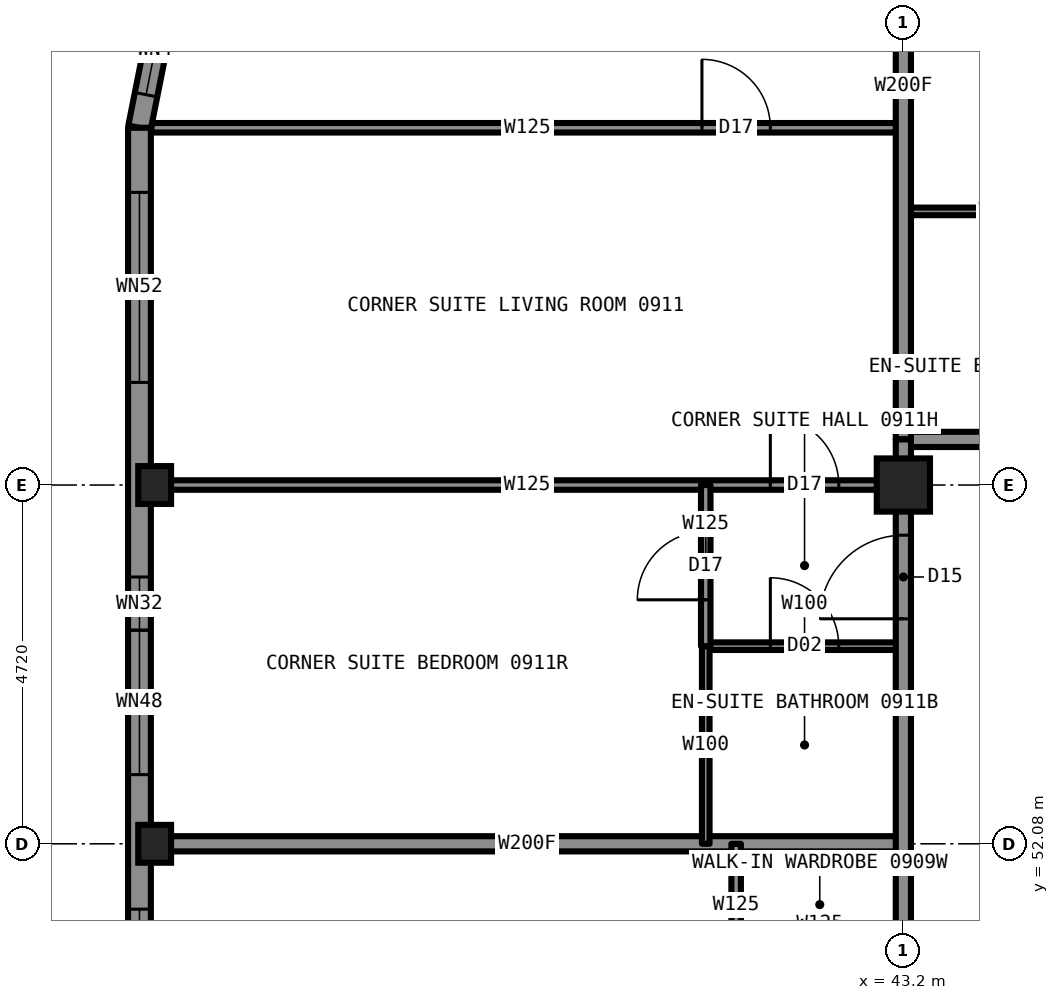
"""IFC4 building model, lengths in metres.
Left out: names, types, materials, properties, quantities, classifications, styles, units other than length and angle.
Written with IfcOpenShell. Run it as: python <this file> out.ifc"""

import sys

from ifc_helpers import new_model, si_unit, direction, frame, frame_2d, origin, origin_2d, place, context, subcontext, project, spatial, rectangle, hollow_rectangle, i_section, extrude, element, fill, save


model = new_model("IFC4")
c1 = context("Model", 3, precision=1e-05, world=origin(), true_north=direction((0.0, 1.0)))
c2 = subcontext(c1, "Body", "Model", "MODEL_VIEW")
j1 = project(units=[si_unit("LENGTHUNIT", "METRE"), si_unit("PLANEANGLEUNIT", "RADIAN")], contexts=[c1])
p1 = place(None, origin())
s1 = spatial("IfcSite", under=j1, at=p1, CompositionType="ELEMENT")
p2 = place(p1, origin())
s2 = spatial("IfcBuilding", under=s1, at=p2, CompositionType="ELEMENT")
p3 = place(p2, frame((0.0, 0.0, 39.0)))
s3 = spatial("IfcBuildingStorey", under=s2, at=p3, CompositionType="ELEMENT", Elevation=39.0)
for number, where, z_axis, x_axis in (
    (1, (33.35, 52.08, 0.0), (0.0, 0.0, 1.0), (1.0, 0.0, 0.0)),
    (2, (33.35, 56.8, 0.0), (0.0, 0.0, 1.0), (1.0, 0.0, 0.0)),
):
    element("IfcColumn", number, at=place(p3, frame(where, z_axis=z_axis, x_axis=x_axis)), inside=s3, PredefinedType="COLUMN", context=c2, shape_type="SweptSolid", body=[
        extrude(i_section(OverallWidth=0.432, OverallDepth=0.498, WebThickness=0.056, FlangeThickness=0.089, at=origin_2d()), origin(), (0.0, 0.0, 1.0), 3.5),
    ])
p4 = place(p3, frame((43.2, 56.8, 0.0), z_axis=(0.0, 0.0, 1.0), x_axis=(1.0, 0.0, 0.0)))
e3 = element("IfcColumn", 3, at=p4, inside=s3, PredefinedType="COLUMN", context=c2, shape_type="SweptSolid", body=[
    extrude(hollow_rectangle(XDim=0.7, YDim=0.7, WallThickness=0.06, at=origin_2d()), origin(), (0.0, 0.0, 1.0), 3.5),
])
p5 = place(p3, frame((33.3, 56.8, 0.0), z_axis=(0.0, 0.0, 1.0), x_axis=(1.0, 0.0, 0.0)))
e4 = element("IfcWall", 4, at=p5, inside=s3, PredefinedType="PARTITIONING", context=c2, shape_type="SweptSolid", body=[
    extrude(rectangle(XDim=9.9, YDim=0.125, at=frame_2d((4.95, 0.0))), origin(), (0.0, 0.0, 1.0), 2.573),
])
p6 = place(p5, frame((8.15, 0.0, 0.0)))
e5 = element("IfcOpeningElement", 5, at=p6, cuts=e4, PredefinedType="OPENING", context=c2, shape_type="SweptSolid", body=[
    extrude(rectangle(XDim=0.9, YDim=2.2, at=frame_2d((0.45, 1.1))), frame((0.0, 0.073, 0.0), z_axis=(0.0, -1.0, 0.0), x_axis=(1.0, 0.0, 0.0)), (0.0, 0.0, 1.0), 0.145),
])
p7 = place(p3, frame((43.2, 57.4, 0.0), z_axis=(0.0, 0.0, 1.0), x_axis=(1.0, 0.0, 0.0)))
e6 = element("IfcWall", 6, at=p7, inside=s3, PredefinedType="PARTITIONING", context=c2, shape_type="SweptSolid", body=[
    extrude(rectangle(XDim=23.6, YDim=0.2, at=frame_2d((11.8, 0.0))), origin(), (0.0, 0.0, 1.0), 3.33),
])
p8 = place(p7, frame((3.0, 0.0, 0.0)))
e7 = element("IfcOpeningElement", 7, at=p8, cuts=e6, PredefinedType="OPENING", context=c2, shape_type="SweptSolid", body=[
    extrude(rectangle(XDim=1.0, YDim=2.2, at=frame_2d((0.5, 1.1))), frame((0.0, 0.11, 0.0), z_axis=(0.0, -1.0, 0.0), x_axis=(1.0, 0.0, 0.0)), (0.0, 0.0, 1.0), 0.22),
])
p9 = place(p7, frame((11.29, 0.0, 0.0)))
e8 = element("IfcOpeningElement", 8, at=p9, cuts=e6, PredefinedType="OPENING", context=c2, shape_type="SweptSolid", body=[
    extrude(rectangle(XDim=1.1, YDim=2.2, at=frame_2d((0.55, 1.1))), frame((0.0, 0.11, 0.0), z_axis=(0.0, -1.0, 0.0), x_axis=(1.0, 0.0, 0.0)), (0.0, 0.0, 1.0), 0.22),
])
p10 = place(p3, frame((43.2, 60.4, 0.0), z_axis=(0.0, 0.0, 1.0), x_axis=(1.0, 0.0, 0.0)))
e9 = element("IfcWall", 9, at=p10, inside=s3, PredefinedType="PARTITIONING", context=c2, shape_type="SweptSolid", body=[
    extrude(rectangle(XDim=2.6, YDim=0.1, at=frame_2d((1.3, 0.0))), origin(), (0.0, 0.0, 1.0), 3.33),
])
p11 = place(p3, frame((33.306, 61.5, 0.0), z_axis=(0.0, 0.0, 1.0), x_axis=(1.0, 0.0, 0.0)))
e10 = element("IfcWall", 10, at=p11, inside=s3, PredefinedType="PARTITIONING", context=c2, shape_type="SweptSolid", body=[
    extrude(rectangle(XDim=9.894, YDim=0.125, at=frame_2d((4.947, 0.0))), origin(), (0.0, 0.0, 1.0), 3.33),
])
p12 = place(p11, frame((7.244, 0.0, 0.0)))
e11 = element("IfcOpeningElement", 11, at=p12, cuts=e10, PredefinedType="OPENING", context=c2, shape_type="SweptSolid", body=[
    extrude(rectangle(XDim=0.9, YDim=2.2, at=frame_2d((0.45, 1.1))), frame((0.0, 0.073, 0.0), z_axis=(0.0, -1.0, 0.0), x_axis=(1.0, 0.0, 0.0)), (0.0, 0.0, 1.0), 0.145),
])
p13 = place(p3, frame((33.3, 52.08, 0.0), z_axis=(0.0, 0.0, 1.0), x_axis=(1.0, 0.0, 0.0)))
e12 = element("IfcWall", 12, at=p13, inside=s3, PredefinedType="PARTITIONING", context=c2, shape_type="SweptSolid", body=[
    extrude(rectangle(XDim=9.9, YDim=0.2, at=frame_2d((4.95, 0.0))), origin(), (0.0, 0.0, 1.0), 2.573),
])
p14 = place(p3, frame((40.6, 54.68, 0.0), z_axis=(0.0, 0.0, 1.0), x_axis=(1.0, 0.0, 0.0)))
e13 = element("IfcWall", 13, at=p14, inside=s3, PredefinedType="PARTITIONING", context=c2, shape_type="SweptSolid", body=[
    extrude(rectangle(XDim=2.6, YDim=0.1, at=frame_2d((1.3, 0.0))), origin(), (0.0, 0.0, 1.0), 3.33),
])
p15 = place(p14, frame((0.85, 0.0, 0.0)))
e14 = element("IfcOpeningElement", 14, at=p15, cuts=e13, PredefinedType="OPENING", context=c2, shape_type="SweptSolid", body=[
    extrude(rectangle(XDim=0.9, YDim=2.1, at=frame_2d((0.45, 1.05))), frame((0.0, 0.06, 0.0), z_axis=(0.0, -1.0, 0.0), x_axis=(1.0, 0.0, 0.0)), (0.0, 0.0, 1.0), 0.12),
])
p16 = place(p3, frame((43.2, 33.2, 0.0), z_axis=(0.0, 0.0, 1.0), x_axis=(0.0, 1.0, 0.0)))
e15 = element("IfcWall", 15, at=p16, inside=s3, PredefinedType="PARTITIONING", context=c2, shape_type="SweptSolid", body=[
    extrude(rectangle(XDim=23.58, YDim=0.2, at=frame_2d((11.79, 0.0))), origin(), (0.0, 0.0, 1.0), 3.33),
])
p17 = place(p16, frame((7.27, 0.0, 0.0)))
e16 = element("IfcOpeningElement", 16, at=p17, cuts=e15, PredefinedType="OPENING", context=c2, shape_type="SweptSolid", body=[
    extrude(rectangle(XDim=1.0, YDim=2.2, at=frame_2d((0.5, 1.1))), frame((0.0, 0.11, 0.0), z_axis=(0.0, -1.0, 0.0), x_axis=(1.0, 0.0, 0.0)), (0.0, 0.0, 1.0), 0.22),
])
p18 = place(p16, frame((12.44, 0.0, 0.0)))
e17 = element("IfcOpeningElement", 17, at=p18, cuts=e15, PredefinedType="OPENING", context=c2, shape_type="SweptSolid", body=[
    extrude(rectangle(XDim=1.0, YDim=2.2, at=frame_2d((0.5, 1.1))), frame((0.0, 0.11, 0.0), z_axis=(0.0, -1.0, 0.0), x_axis=(1.0, 0.0, 0.0)), (0.0, 0.0, 1.0), 0.22),
])
p19 = place(p16, frame((21.84, 0.0, 0.0)))
e18 = element("IfcOpeningElement", 18, at=p19, cuts=e15, PredefinedType="OPENING", context=c2, shape_type="SweptSolid", body=[
    extrude(rectangle(XDim=1.1, YDim=2.2, at=frame_2d((0.55, 1.1))), frame((0.0, 0.11, 0.0), z_axis=(0.0, -1.0, 0.0), x_axis=(1.0, 0.0, 0.0)), (0.0, 0.0, 1.0), 0.22),
])
p20 = place(p16, frame((0.66, 0.0, 0.0)))
e19 = element("IfcOpeningElement", 19, at=p20, cuts=e15, PredefinedType="OPENING", context=c2, shape_type="SweptSolid", body=[
    extrude(rectangle(XDim=1.1, YDim=2.2, at=frame_2d((0.55, 1.1))), frame((0.0, 0.11, 0.0), z_axis=(0.0, -1.0, 0.0), x_axis=(1.0, 0.0, 0.0)), (0.0, 0.0, 1.0), 0.22),
])
p21 = place(p3, frame((43.2, 57.4, 0.0), z_axis=(0.0, 0.0, 1.0), x_axis=(0.0, 1.0, 0.0)))
e20 = element("IfcWall", 20, at=p21, inside=s3, PredefinedType="PARTITIONING", context=c2, shape_type="SweptSolid", body=[
    extrude(rectangle(XDim=9.3, YDim=0.2, at=frame_2d((4.65, 0.0))), origin(), (0.0, 0.0, 1.0), 2.573),
])
p22 = place(p3, frame((41.0, 50.48, 0.0), z_axis=(0.0, 0.0, 1.0), x_axis=(0.0, 1.0, 0.0)))
e21 = element("IfcWall", 21, at=p22, inside=s3, PredefinedType="PARTITIONING", context=c2, shape_type="SweptSolid", body=[
    extrude(rectangle(XDim=1.6, YDim=0.125, at=frame_2d((0.8, 0.0))), origin(), (0.0, 0.0, 1.0), 3.33),
])
p23 = place(p3, frame((40.6, 52.08, 0.0), z_axis=(0.0, 0.0, 1.0), x_axis=(0.0, 1.0, 0.0)))
e22 = element("IfcWall", 22, at=p23, inside=s3, PredefinedType="PARTITIONING", context=c2, shape_type="SweptSolid", body=[
    extrude(rectangle(XDim=2.6, YDim=0.1, at=frame_2d((1.3, 0.0))), origin(), (0.0, 0.0, 1.0), 3.33),
])
p24 = place(p3, frame((40.6, 54.68, 0.0), z_axis=(0.0, 0.0, 1.0), x_axis=(0.0, 1.0, 0.0)))
e23 = element("IfcWall", 23, at=p24, inside=s3, PredefinedType="PARTITIONING", context=c2, shape_type="SweptSolid", body=[
    extrude(rectangle(XDim=2.12, YDim=0.125, at=frame_2d((1.06, 0.0))), origin(), (0.0, 0.0, 1.0), 3.33),
])
p25 = place(p24, frame((0.61, 0.0, 0.0)))
e24 = element("IfcOpeningElement", 24, at=p25, cuts=e23, PredefinedType="OPENING", context=c2, shape_type="SweptSolid", body=[
    extrude(rectangle(XDim=0.9, YDim=2.2, at=frame_2d((0.45, 1.1))), frame((0.0, 0.073, 0.0), z_axis=(0.0, -1.0, 0.0), x_axis=(1.0, 0.0, 0.0)), (0.0, 0.0, 1.0), 0.145),
])
p26 = place(p3, frame((33.557, 63.547, 0.0), z_axis=(0.0, 0.0, 1.0), x_axis=(-0.195081421501, -0.980787050784, 0.0)))
e25 = element("IfcWall", 25, at=p26, inside=s3, PredefinedType="SOLIDWALL", context=c2, shape_type="SweptSolid", body=[
    extrude(rectangle(XDim=2.087, YDim=0.3, at=frame_2d((1.044, 0.0))), origin(), (0.0, 0.0, 1.0), 3.33),
])
p27 = place(p26, frame((0.444, 0.0, 0.5)))
e26 = element("IfcOpeningElement", 26, at=p27, cuts=e25, PredefinedType="OPENING", context=c2, shape_type="SweptSolid", body=[
    extrude(rectangle(XDim=1.2, YDim=2.0, at=frame_2d((0.6, 1.0))), frame((0.0, 0.16, 0.0), z_axis=(0.0, -1.0, 0.0), x_axis=(1.0, 0.0, 0.0)), (0.0, 0.0, 1.0), 0.32),
])
p28 = place(p3, frame((33.15, 61.5, 0.0), z_axis=(0.0, 0.0, 1.0), x_axis=(0.0, -1.0, 0.0)))
e27 = element("IfcWall", 27, at=p28, inside=s3, PredefinedType="SOLIDWALL", context=c2, shape_type="SweptSolid", body=[
    extrude(rectangle(XDim=33.0, YDim=0.3, at=frame_2d((16.5, 0.0))), origin(), (0.0, 0.0, 1.0), 2.83),
])
p29 = place(p28, frame((0.85, 0.0, 0.5)))
e28 = element("IfcOpeningElement", 28, at=p29, cuts=e27, PredefinedType="OPENING", context=c2, shape_type="SweptSolid", body=[
    extrude(rectangle(XDim=2.5, YDim=2.0, at=frame_2d((1.25, 1.0))), frame((0.0, 0.16, 0.0), z_axis=(0.0, -1.0, 0.0), x_axis=(1.0, 0.0, 0.0)), (0.0, 0.0, 1.0), 0.32),
])
p30 = place(p28, frame((6.61, 0.0, 0.5)))
e29 = element("IfcOpeningElement", 29, at=p30, cuts=e27, PredefinedType="OPENING", context=c2, shape_type="SweptSolid", body=[
    extrude(rectangle(XDim=1.9, YDim=1.9, at=frame_2d((0.95, 0.95))), frame((0.0, 0.16, 0.0), z_axis=(0.0, -1.0, 0.0), x_axis=(1.0, 0.0, 0.0)), (0.0, 0.0, 1.0), 0.32),
])
p31 = place(p28, frame((10.28, 0.0, 0.5)))
e30 = element("IfcOpeningElement", 30, at=p31, cuts=e27, PredefinedType="OPENING", context=c2, shape_type="SweptSolid", body=[
    extrude(rectangle(XDim=3.0, YDim=2.0, at=frame_2d((1.5, 1.0))), frame((0.0, 0.16, 0.0), z_axis=(0.0, -1.0, 0.0), x_axis=(1.0, 0.0, 0.0)), (0.0, 0.0, 1.0), 0.32),
])
p32 = place(p28, frame((15.0, 0.0, 0.5)))
e31 = element("IfcOpeningElement", 31, at=p32, cuts=e27, PredefinedType="OPENING", context=c2, shape_type="SweptSolid", body=[
    extrude(rectangle(XDim=3.0, YDim=2.0, at=frame_2d((1.5, 1.0))), frame((0.0, 0.16, 0.0), z_axis=(0.0, -1.0, 0.0), x_axis=(1.0, 0.0, 0.0)), (0.0, 0.0, 1.0), 0.32),
])
p33 = place(p28, frame((19.72, 0.0, 0.5)))
e32 = element("IfcOpeningElement", 32, at=p33, cuts=e27, PredefinedType="OPENING", context=c2, shape_type="SweptSolid", body=[
    extrude(rectangle(XDim=3.0, YDim=2.0, at=frame_2d((1.5, 1.0))), frame((0.0, 0.16, 0.0), z_axis=(0.0, -1.0, 0.0), x_axis=(1.0, 0.0, 0.0)), (0.0, 0.0, 1.0), 0.32),
])
p34 = place(p28, frame((24.44, 0.0, 0.5)))
e33 = element("IfcOpeningElement", 33, at=p34, cuts=e27, PredefinedType="OPENING", context=c2, shape_type="SweptSolid", body=[
    extrude(rectangle(XDim=1.9, YDim=1.9, at=frame_2d((0.95, 0.95))), frame((0.0, 0.16, 0.0), z_axis=(0.0, -1.0, 0.0), x_axis=(1.0, 0.0, 0.0)), (0.0, 0.0, 1.0), 0.32),
])
p35 = place(p28, frame((29.6, 0.0, 0.5)))
e34 = element("IfcOpeningElement", 34, at=p35, cuts=e27, PredefinedType="OPENING", context=c2, shape_type="SweptSolid", body=[
    extrude(rectangle(XDim=2.5, YDim=2.0, at=frame_2d((1.25, 1.0))), frame((0.0, 0.16, 0.0), z_axis=(0.0, -1.0, 0.0), x_axis=(1.0, 0.0, 0.0)), (0.0, 0.0, 1.0), 0.32),
])
p36 = place(p28, frame((5.91, 0.0, 0.5)))
e35 = element("IfcOpeningElement", 35, at=p36, cuts=e27, PredefinedType="OPENING", context=c2, shape_type="SweptSolid", body=[
    extrude(rectangle(XDim=0.7, YDim=1.0, at=frame_2d((0.35, 0.5))), frame((0.0, 0.16, 0.0), z_axis=(0.0, -1.0, 0.0), x_axis=(1.0, 0.0, 0.0)), (0.0, 0.0, 1.0), 0.32),
])
p37 = place(p28, frame((26.39, 0.0, 0.5)))
e36 = element("IfcOpeningElement", 36, at=p37, cuts=e27, PredefinedType="OPENING", context=c2, shape_type="SweptSolid", body=[
    extrude(rectangle(XDim=0.7, YDim=1.0, at=frame_2d((0.35, 0.5))), frame((0.0, 0.16, 0.0), z_axis=(0.0, -1.0, 0.0), x_axis=(1.0, 0.0, 0.0)), (0.0, 0.0, 1.0), 0.32),
])
p38 = place(p3, frame((43.2, 56.78, 0.0), z_axis=(0.0, 0.0, 1.0), x_axis=(0.0, 1.0, 0.0)))
e37 = element("IfcWall", 37, at=p38, inside=s3, PredefinedType="PARTITIONING", context=c2, shape_type="SweptSolid", body=[
    extrude(rectangle(XDim=0.62, YDim=0.2, at=frame_2d((0.31, 0.0))), origin(), (0.0, 0.0, 1.0), 2.573),
])
p39 = place(p6, origin())
e38 = element("IfcDoor", 38, at=p39, inside=s3, OperationType="SINGLE_SWING_LEFT", PredefinedType="DOOR", context=c2, shape_type="SweptSolid", body=[
    extrude(rectangle(XDim=0.9, YDim=2.2, at=frame_2d((0.45, 1.1))), frame((0.0, 0.025, 0.0), z_axis=(0.0, -1.0, 0.0), x_axis=(1.0, 0.0, 0.0)), (0.0, 0.0, 1.0), 0.05),
])
fill(e5, e38)
p40 = place(p15, origin())
e39 = element("IfcDoor", 39, at=p40, inside=s3, OperationType="SINGLE_SWING_RIGHT", PredefinedType="DOOR", context=c2, shape_type="SweptSolid", body=[
    extrude(rectangle(XDim=0.9, YDim=2.1, at=frame_2d((0.45, 1.05))), frame((0.0, 0.025, 0.0), z_axis=(0.0, -1.0, 0.0), x_axis=(1.0, 0.0, 0.0)), (0.0, 0.0, 1.0), 0.05),
])
fill(e14, e39)
p41 = place(p19, origin())
e40 = element("IfcDoor", 40, at=p41, inside=s3, OperationType="SINGLE_SWING_LEFT", PredefinedType="DOOR", context=c2, shape_type="SweptSolid", body=[
    extrude(rectangle(XDim=1.1, YDim=2.2, at=frame_2d((0.55, 1.1))), frame((0.0, 0.025, 0.0), z_axis=(0.0, -1.0, 0.0), x_axis=(1.0, 0.0, 0.0)), (0.0, 0.0, 1.0), 0.05),
])
fill(e18, e40)
p42 = place(p12, origin())
e41 = element("IfcDoor", 41, at=p42, inside=s3, OperationType="SINGLE_SWING_LEFT", PredefinedType="DOOR", context=c2, shape_type="SweptSolid", body=[
    extrude(rectangle(XDim=0.9, YDim=2.2, at=frame_2d((0.45, 1.1))), frame((0.0, 0.025, 0.0), z_axis=(0.0, -1.0, 0.0), x_axis=(1.0, 0.0, 0.0)), (0.0, 0.0, 1.0), 0.05),
])
fill(e11, e41)
p43 = place(p25, origin())
e42 = element("IfcDoor", 42, at=p43, inside=s3, OperationType="SINGLE_SWING_LEFT", PredefinedType="DOOR", context=c2, shape_type="SweptSolid", body=[
    extrude(rectangle(XDim=0.9, YDim=2.2, at=frame_2d((0.45, 1.1))), frame((0.0, 0.025, 0.0), z_axis=(0.0, -1.0, 0.0), x_axis=(1.0, 0.0, 0.0)), (0.0, 0.0, 1.0), 0.05),
])
fill(e24, e42)
p44 = place(p27, origin())
e43 = element("IfcWindow", 43, at=p44, inside=s3, PartitioningType="SINGLE_PANEL", PredefinedType="WINDOW", context=c2, shape_type="SweptSolid", body=[
    extrude(rectangle(XDim=1.2, YDim=2.0, at=frame_2d((0.6, 1.0))), frame((0.0, 0.03, 0.0), z_axis=(0.0, -1.0, 0.0), x_axis=(1.0, 0.0, 0.0)), (0.0, 0.0, 1.0), 0.06),
])
fill(e26, e43)
p45 = place(p29, origin())
e44 = element("IfcWindow", 44, at=p45, inside=s3, PartitioningType="SINGLE_PANEL", PredefinedType="WINDOW", context=c2, shape_type="SweptSolid", body=[
    extrude(rectangle(XDim=2.5, YDim=2.0, at=frame_2d((1.25, 1.0))), frame((0.0, 0.03, 0.0), z_axis=(0.0, -1.0, 0.0), x_axis=(1.0, 0.0, 0.0)), (0.0, 0.0, 1.0), 0.06),
])
fill(e28, e44)
p46 = place(p30, origin())
e45 = element("IfcWindow", 45, at=p46, inside=s3, PartitioningType="SINGLE_PANEL", PredefinedType="WINDOW", context=c2, shape_type="SweptSolid", body=[
    extrude(rectangle(XDim=1.9, YDim=1.9, at=frame_2d((0.95, 0.95))), frame((0.0, 0.03, 0.0), z_axis=(0.0, -1.0, 0.0), x_axis=(1.0, 0.0, 0.0)), (0.0, 0.0, 1.0), 0.06),
])
fill(e29, e45)
p47 = place(p31, origin())
e46 = element("IfcWindow", 46, at=p47, inside=s3, PartitioningType="SINGLE_PANEL", PredefinedType="WINDOW", context=c2, shape_type="SweptSolid", body=[
    extrude(rectangle(XDim=3.0, YDim=2.0, at=frame_2d((1.5, 1.0))), frame((0.0, 0.03, 0.0), z_axis=(0.0, -1.0, 0.0), x_axis=(1.0, 0.0, 0.0)), (0.0, 0.0, 1.0), 0.06),
])
fill(e30, e46)
p48 = place(p36, origin())
e47 = element("IfcWindow", 47, at=p48, inside=s3, PartitioningType="SINGLE_PANEL", PredefinedType="WINDOW", context=c2, shape_type="SweptSolid", body=[
    extrude(rectangle(XDim=0.7, YDim=1.0, at=frame_2d((0.35, 0.5))), frame((0.0, 0.03, 0.0), z_axis=(0.0, -1.0, 0.0), x_axis=(1.0, 0.0, 0.0)), (0.0, 0.0, 1.0), 0.06),
])
fill(e35, e47)
save(model, sys.argv[1])
